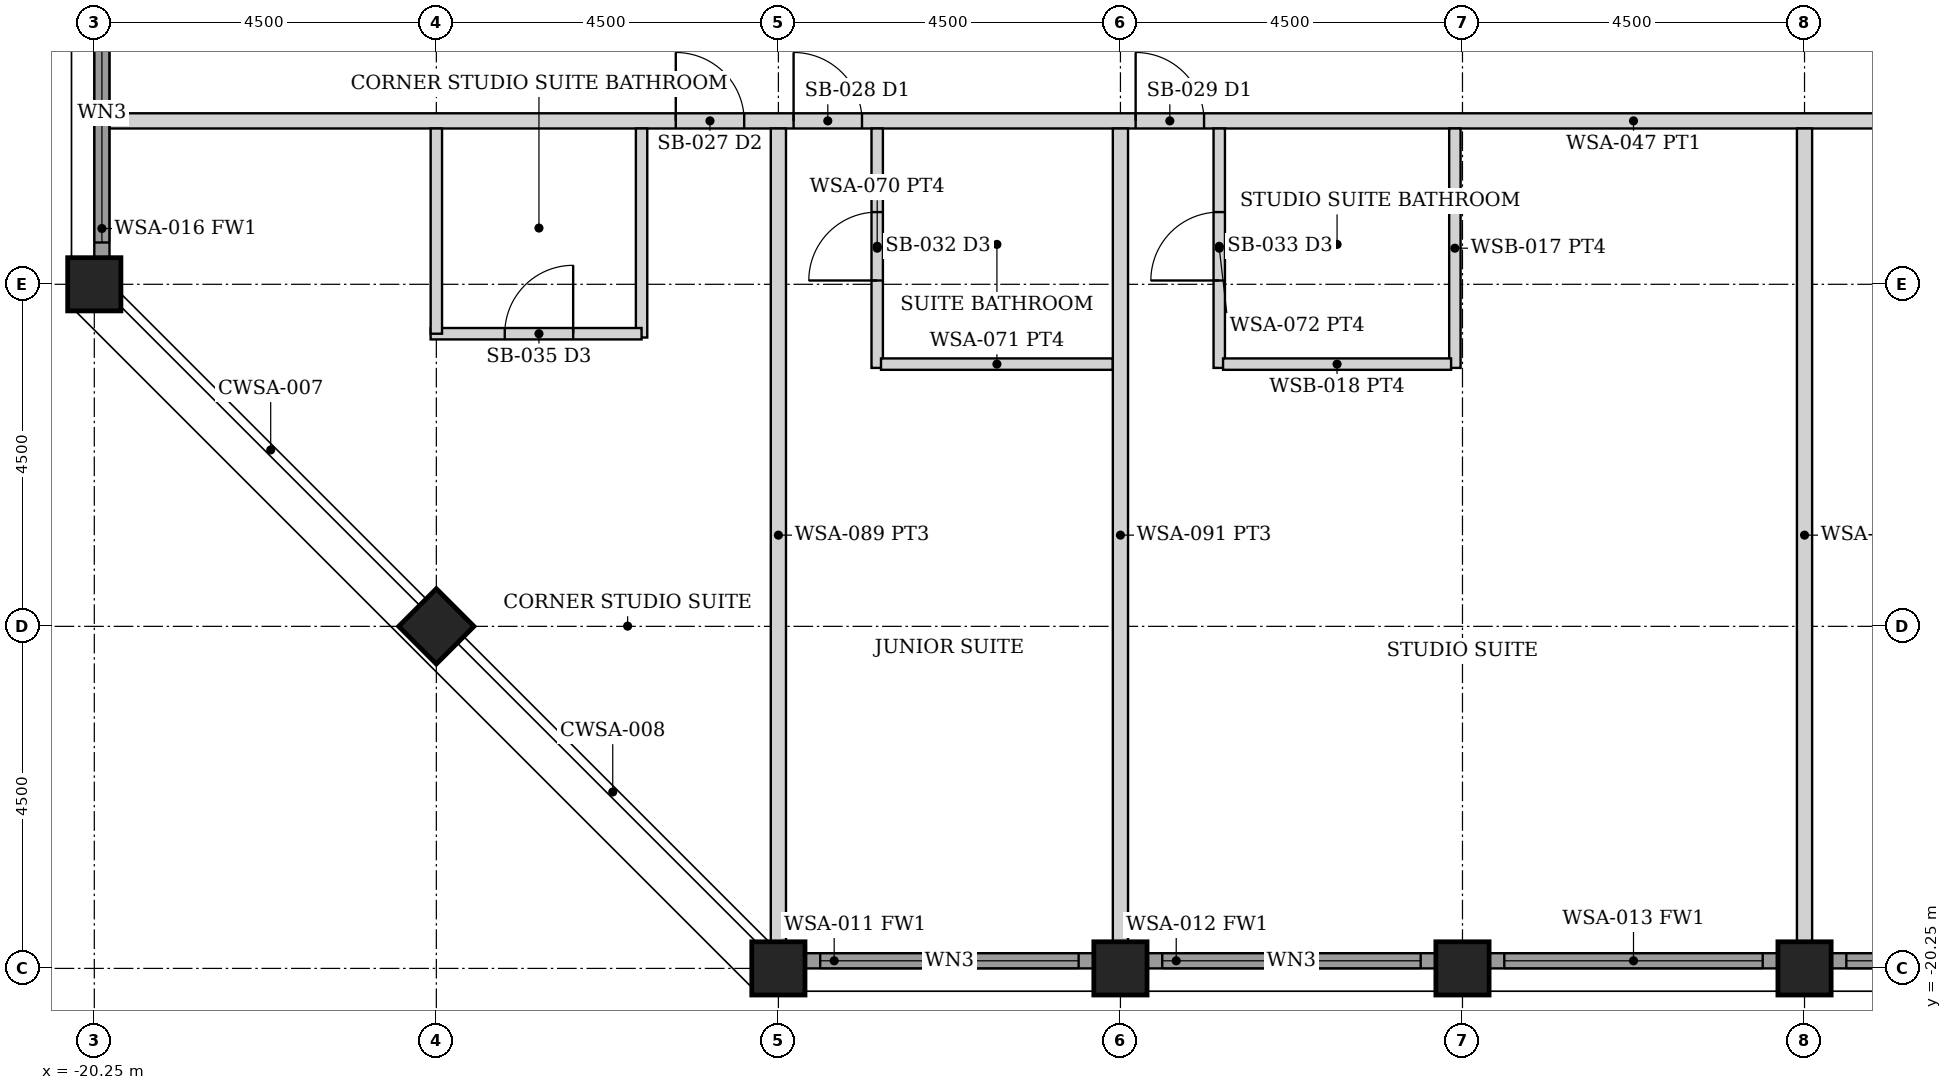
"""IFC4 building model, lengths in metres.
Left out: names, types, materials, properties, quantities, classifications, styles, units other than length and angle.
Written with IfcOpenShell. Run it as: python <this file> out.ifc"""

import sys

from ifc_helpers import new_model, si_unit, direction, frame, frame_2d, origin, origin_2d, place, context, subcontext, project, spatial, rectangle, hollow_rectangle, extrude, element, fill, save


model = new_model("IFC4")
c1 = context("Model", 3, precision=1e-05, world=origin(), true_north=direction((0.0, 1.0)))
c2 = subcontext(c1, "Body", "Model", "MODEL_VIEW")
j1 = project(units=[si_unit("LENGTHUNIT", "METRE"), si_unit("PLANEANGLEUNIT", "RADIAN")], contexts=[c1])
p1 = place(None, origin())
s1 = spatial("IfcSite", under=j1, at=p1, CompositionType="ELEMENT")
p2 = place(p1, origin())
s2 = spatial("IfcBuilding", under=s1, at=p2, CompositionType="ELEMENT")
p3 = place(p2, frame((0.0, 0.0, 212.05)))
s3 = spatial("IfcBuildingStorey", under=s2, at=p3, CompositionType="ELEMENT", Elevation=212.05)
for number, where, z_axis, x_axis in (
    (1, (-11.25, -20.25, 0.0), (0.0, 0.0, 1.0), (0.0, 1.0, 0.0)),
    (2, (-20.25, -11.25, 0.0), (0.0, 0.0, 1.0), (1.0, 0.0, 0.0)),
    (3, (-6.75, -20.25, 0.0), (0.0, 0.0, 1.0), (0.0, 1.0, 0.0)),
    (4, (-2.25, -20.25, 0.0), (0.0, 0.0, 1.0), (0.0, 1.0, 0.0)),
    (5, (2.25, -20.25, 0.0), (0.0, 0.0, 1.0), (0.0, 1.0, 0.0)),
    (6, (-15.75, -15.75, 0.0), (0.0, 0.0, 1.0), (0.707, 0.707, 0.0)),
):
    element("IfcColumn", number, at=place(p3, frame(where, z_axis=z_axis, x_axis=x_axis)), inside=s3, PredefinedType="COLUMN", context=c2, shape_type="SweptSolid", body=[
        extrude(hollow_rectangle(XDim=0.7, YDim=0.7, WallThickness=0.045, at=origin_2d()), origin(), (0.0, 0.0, 1.0), 3.75),
    ])
p4 = place(p3, frame((-10.895, -20.15, 0.0), z_axis=(0.0, 0.0, 1.0), x_axis=(1.0, 0.0, 0.0)))
e7 = element("IfcWall", 7, at=p4, inside=s3, PredefinedType="SOLIDWALL", context=c2, shape_type="SweptSolid", body=[
    extrude(rectangle(XDim=3.79, YDim=0.2, at=frame_2d((1.895, 0.0))), origin(), (0.0, 0.0, 1.0), 2.629),
])
p5 = place(p4, frame((0.195, 0.0, 0.3)))
e8 = element("IfcOpeningElement", 8, at=p5, cuts=e7, PredefinedType="OPENING", context=c2, shape_type="SweptSolid", body=[
    extrude(rectangle(XDim=3.4, YDim=2.179, at=frame_2d((1.7, 1.089))), frame((0.0, 0.11, 0.0), z_axis=(0.0, -1.0, 0.0), x_axis=(1.0, 0.0, 0.0)), (0.0, 0.0, 1.0), 0.22),
])
p6 = place(p3, frame((-6.395, -20.15, 0.0), z_axis=(0.0, 0.0, 1.0), x_axis=(1.0, 0.0, 0.0)))
e9 = element("IfcWall", 9, at=p6, inside=s3, PredefinedType="SOLIDWALL", context=c2, shape_type="SweptSolid", body=[
    extrude(rectangle(XDim=3.79, YDim=0.2, at=frame_2d((1.895, 0.0))), origin(), (0.0, 0.0, 1.0), 2.629),
])
p7 = place(p6, frame((0.195, 0.0, 0.3)))
e10 = element("IfcOpeningElement", 10, at=p7, cuts=e9, PredefinedType="OPENING", context=c2, shape_type="SweptSolid", body=[
    extrude(rectangle(XDim=3.4, YDim=2.179, at=frame_2d((1.7, 1.089))), frame((0.0, 0.11, 0.0), z_axis=(0.0, -1.0, 0.0), x_axis=(1.0, 0.0, 0.0)), (0.0, 0.0, 1.0), 0.22),
])
p8 = place(p3, frame((-1.895, -20.15, 0.0), z_axis=(0.0, 0.0, 1.0), x_axis=(1.0, 0.0, 0.0)))
e11 = element("IfcWall", 11, at=p8, inside=s3, PredefinedType="SOLIDWALL", context=c2, shape_type="SweptSolid", body=[
    extrude(rectangle(XDim=3.79, YDim=0.2, at=frame_2d((1.895, 0.0))), origin(), (0.0, 0.0, 1.0), 2.629),
])
p9 = place(p8, frame((0.195, 0.0, 0.3)))
e12 = element("IfcOpeningElement", 12, at=p9, cuts=e11, PredefinedType="OPENING", context=c2, shape_type="SweptSolid", body=[
    extrude(rectangle(XDim=3.4, YDim=2.179, at=frame_2d((1.7, 1.089))), frame((0.0, 0.11, 0.0), z_axis=(0.0, -1.0, 0.0), x_axis=(1.0, 0.0, 0.0)), (0.0, 0.0, 1.0), 0.22),
])
p10 = place(p3, frame((2.605, -20.15, 0.0), z_axis=(0.0, 0.0, 1.0), x_axis=(1.0, 0.0, 0.0)))
e13 = element("IfcWall", 13, at=p10, inside=s3, PredefinedType="SOLIDWALL", context=c2, shape_type="SweptSolid", body=[
    extrude(rectangle(XDim=3.79, YDim=0.2, at=frame_2d((1.895, 0.0))), origin(), (0.0, 0.0, 1.0), 2.629),
])
p11 = place(p10, frame((0.195, 0.0, 0.3)))
e14 = element("IfcOpeningElement", 14, at=p11, cuts=e13, PredefinedType="OPENING", context=c2, shape_type="SweptSolid", body=[
    extrude(rectangle(XDim=3.4, YDim=2.179, at=frame_2d((1.7, 1.089))), frame((0.0, 0.11, 0.0), z_axis=(0.0, -1.0, 0.0), x_axis=(1.0, 0.0, 0.0)), (0.0, 0.0, 1.0), 0.22),
])
p12 = place(p3, frame((-20.15, -10.895, 0.0), z_axis=(0.0, 0.0, 1.0), x_axis=(0.0, 1.0, 0.0)))
e15 = element("IfcWall", 15, at=p12, inside=s3, PredefinedType="SOLIDWALL", context=c2, shape_type="SweptSolid", body=[
    extrude(rectangle(XDim=3.79, YDim=0.2, at=frame_2d((1.895, 0.0))), origin(), (0.0, 0.0, 1.0), 2.629),
])
p13 = place(p12, frame((0.195, 0.0, 0.3)))
e16 = element("IfcOpeningElement", 16, at=p13, cuts=e15, PredefinedType="OPENING", context=c2, shape_type="SweptSolid", body=[
    extrude(rectangle(XDim=3.4, YDim=2.179, at=frame_2d((1.7, 1.089))), frame((0.0, 0.11, 0.0), z_axis=(0.0, -1.0, 0.0), x_axis=(1.0, 0.0, 0.0)), (0.0, 0.0, 1.0), 0.22),
])
p14 = place(p3, frame((-20.05, -9.1, 0.0), z_axis=(0.0, 0.0, 1.0), x_axis=(1.0, 0.0, 0.0)))
e17 = element("IfcWall", 17, at=p14, inside=s3, PredefinedType="PARTITIONING", context=c2, shape_type="SweptSolid", body=[
    extrude(rectangle(XDim=40.1, YDim=0.2, at=frame_2d((20.05, 0.0))), origin(), (0.0, 0.0, 1.0), 2.629),
])
p15 = place(p14, frame((9.0, 0.0, 0.0)))
e18 = element("IfcOpeningElement", 18, at=p15, cuts=e17, PredefinedType="OPENING", context=c2, shape_type="SweptSolid", body=[
    extrude(rectangle(XDim=0.9, YDim=2.1, at=frame_2d((0.45, 1.05))), frame((0.0, 0.11, 0.0), z_axis=(0.0, -1.0, 0.0), x_axis=(1.0, 0.0, 0.0)), (0.0, 0.0, 1.0), 0.22),
])
p16 = place(p14, frame((13.5, 0.0, 0.0)))
e19 = element("IfcOpeningElement", 19, at=p16, cuts=e17, PredefinedType="OPENING", context=c2, shape_type="SweptSolid", body=[
    extrude(rectangle(XDim=0.9, YDim=2.1, at=frame_2d((0.45, 1.05))), frame((0.0, 0.11, 0.0), z_axis=(0.0, -1.0, 0.0), x_axis=(1.0, 0.0, 0.0)), (0.0, 0.0, 1.0), 0.22),
])
p17 = place(p14, frame((30.2, 0.0, 0.0)))
e20 = element("IfcOpeningElement", 20, at=p17, cuts=e17, PredefinedType="OPENING", context=c2, shape_type="SweptSolid", body=[
    extrude(rectangle(XDim=0.9, YDim=2.1, at=frame_2d((0.45, 1.05))), frame((0.0, 0.11, 0.0), z_axis=(0.0, -1.0, 0.0), x_axis=(1.0, 0.0, 0.0)), (0.0, 0.0, 1.0), 0.22),
])
p18 = place(p14, frame((31.75, 0.0, 0.0)))
e21 = element("IfcOpeningElement", 21, at=p18, cuts=e17, PredefinedType="OPENING", context=c2, shape_type="SweptSolid", body=[
    extrude(rectangle(XDim=0.9, YDim=2.1, at=frame_2d((0.45, 1.05))), frame((0.0, 0.11, 0.0), z_axis=(0.0, -1.0, 0.0), x_axis=(1.0, 0.0, 0.0)), (0.0, 0.0, 1.0), 0.22),
])
p19 = place(p14, frame((7.45, 0.0, 0.0)))
e22 = element("IfcOpeningElement", 22, at=p19, cuts=e17, PredefinedType="OPENING", context=c2, shape_type="SweptSolid", body=[
    extrude(rectangle(XDim=0.9, YDim=2.1, at=frame_2d((0.45, 1.05))), frame((0.0, 0.11, 0.0), z_axis=(0.0, -1.0, 0.0), x_axis=(1.0, 0.0, 0.0)), (0.0, 0.0, 1.0), 0.22),
])
p20 = place(p3, frame((-9.95, -12.35, 0.0), z_axis=(0.0, 0.0, 1.0), x_axis=(0.0, 1.0, 0.0)))
e23 = element("IfcWall", 23, at=p20, inside=s3, PredefinedType="PARTITIONING", context=c2, shape_type="SweptSolid", body=[
    extrude(rectangle(XDim=3.15, YDim=0.15, at=frame_2d((1.575, 0.0))), origin(), (0.0, 0.0, 1.0), 2.629),
])
p21 = place(p20, frame((1.15, 0.0, 0.0)))
e24 = element("IfcOpeningElement", 24, at=p21, cuts=e23, PredefinedType="OPENING", context=c2, shape_type="SweptSolid", body=[
    extrude(rectangle(XDim=0.9, YDim=2.1, at=frame_2d((0.45, 1.05))), frame((0.0, 0.085, 0.0), z_axis=(0.0, -1.0, 0.0), x_axis=(1.0, 0.0, 0.0)), (0.0, 0.0, 1.0), 0.17),
])
p22 = place(p3, frame((-9.9, -12.3, 0.0), z_axis=(0.0, 0.0, 1.0), x_axis=(1.0, 0.0, 0.0)))
e25 = element("IfcWall", 25, at=p22, inside=s3, PredefinedType="PARTITIONING", context=c2, shape_type="SweptSolid", body=[
    extrude(rectangle(XDim=3.05, YDim=0.15, at=frame_2d((1.525, 0.0))), origin(), (0.0, 0.0, 1.0), 2.629),
])
p23 = place(p3, frame((-5.45, -12.35, 0.0), z_axis=(0.0, 0.0, 1.0), x_axis=(0.0, 1.0, 0.0)))
e26 = element("IfcWall", 26, at=p23, inside=s3, PredefinedType="PARTITIONING", context=c2, shape_type="SweptSolid", body=[
    extrude(rectangle(XDim=3.15, YDim=0.15, at=frame_2d((1.575, 0.0))), origin(), (0.0, 0.0, 1.0), 2.629),
])
p24 = place(p23, frame((1.15, 0.0, 0.0)))
e27 = element("IfcOpeningElement", 27, at=p24, cuts=e26, PredefinedType="OPENING", context=c2, shape_type="SweptSolid", body=[
    extrude(rectangle(XDim=0.9, YDim=2.1, at=frame_2d((0.45, 1.05))), frame((0.0, 0.085, 0.0), z_axis=(0.0, -1.0, 0.0), x_axis=(1.0, 0.0, 0.0)), (0.0, 0.0, 1.0), 0.17),
])
p25 = place(p3, frame((-2.35, -12.35, 0.0), z_axis=(0.0, 0.0, 1.0), x_axis=(0.0, 1.0, 0.0)))
e28 = element("IfcWall", 28, at=p25, inside=s3, PredefinedType="PARTITIONING", context=c2, shape_type="SweptSolid", body=[
    extrude(rectangle(XDim=3.15, YDim=0.15, at=frame_2d((1.575, 0.0))), origin(), (0.0, 0.0, 1.0), 2.629),
])
p26 = place(p3, frame((-5.4, -12.3, 0.0), z_axis=(0.0, 0.0, 1.0), x_axis=(1.0, 0.0, 0.0)))
e29 = element("IfcWall", 29, at=p26, inside=s3, PredefinedType="PARTITIONING", context=c2, shape_type="SweptSolid", body=[
    extrude(rectangle(XDim=3.0, YDim=0.15, at=frame_2d((1.5, 0.0))), origin(), (0.0, 0.0, 1.0), 2.629),
])
for number, where, z_axis, x_axis in (
    (30, (-11.25, -19.9, 0.0), (0.0, 0.0, 1.0), (0.0, 1.0, 0.0)),
    (31, (-6.75, -19.9, 0.0), (0.0, 0.0, 1.0), (0.0, 1.0, 0.0)),
    (32, (2.25, -19.9, 0.0), (0.0, 0.0, 1.0), (0.0, 1.0, 0.0)),
):
    element("IfcWall", number, at=place(p3, frame(where, z_axis=z_axis, x_axis=x_axis)), inside=s3, PredefinedType="PARTITIONING", context=c2, shape_type="SweptSolid", body=[
        extrude(rectangle(XDim=10.7, YDim=0.2, at=frame_2d((5.35, 0.0))), origin(), (0.0, 0.0, 1.0), 2.629),
    ])
p27 = place(p3, frame((-13.05, -11.95, 0.0), z_axis=(0.0, 0.0, 1.0), x_axis=(0.0, 1.0, 0.0)))
e33 = element("IfcWall", 33, at=p27, inside=s3, PredefinedType="PARTITIONING", context=c2, shape_type="SweptSolid", body=[
    extrude(rectangle(XDim=2.75, YDim=0.15, at=frame_2d((1.375, 0.0))), origin(), (0.0, 0.0, 1.0), 2.629),
])
p28 = place(p3, frame((-15.825, -11.9, 0.0), z_axis=(0.0, 0.0, 1.0), x_axis=(1.0, 0.0, 0.0)))
e34 = element("IfcWall", 34, at=p28, inside=s3, PredefinedType="PARTITIONING", context=c2, shape_type="SweptSolid", body=[
    extrude(rectangle(XDim=2.775, YDim=0.15, at=frame_2d((1.387, 0.0))), origin(), (0.0, 0.0, 1.0), 2.629),
])
p29 = place(p28, frame((0.975, 0.0, 0.0)))
e35 = element("IfcOpeningElement", 35, at=p29, cuts=e34, PredefinedType="OPENING", context=c2, shape_type="SweptSolid", body=[
    extrude(rectangle(XDim=0.9, YDim=2.1, at=frame_2d((0.45, 1.05))), frame((0.0, 0.085, 0.0), z_axis=(0.0, -1.0, 0.0), x_axis=(1.0, 0.0, 0.0)), (0.0, 0.0, 1.0), 0.17),
])
p30 = place(p3, frame((-15.75, -11.9, 0.0), z_axis=(0.0, 0.0, 1.0), x_axis=(0.0, 1.0, 0.0)))
e36 = element("IfcWall", 36, at=p30, inside=s3, PredefinedType="PARTITIONING", context=c2, shape_type="SweptSolid", body=[
    extrude(rectangle(XDim=2.7, YDim=0.15, at=frame_2d((1.35, 0.0))), origin(), (0.0, 0.0, 1.0), 2.629),
])
p31 = place(p5, origin())
e37 = element("IfcWindow", 37, at=p31, inside=s3, PartitioningType="SINGLE_PANEL", PredefinedType="WINDOW", context=c2, shape_type="SweptSolid", body=[
    extrude(rectangle(XDim=3.4, YDim=2.179, at=frame_2d((1.7, 1.089))), frame((0.0, 0.03, 0.0), z_axis=(0.0, -1.0, 0.0), x_axis=(1.0, 0.0, 0.0)), (0.0, 0.0, 1.0), 0.06),
])
fill(e8, e37)
p32 = place(p7, origin())
e38 = element("IfcWindow", 38, at=p32, inside=s3, PartitioningType="SINGLE_PANEL", PredefinedType="WINDOW", context=c2, shape_type="SweptSolid", body=[
    extrude(rectangle(XDim=3.4, YDim=2.179, at=frame_2d((1.7, 1.089))), frame((0.0, 0.03, 0.0), z_axis=(0.0, -1.0, 0.0), x_axis=(1.0, 0.0, 0.0)), (0.0, 0.0, 1.0), 0.06),
])
fill(e10, e38)
p33 = place(p9, origin())
e39 = element("IfcWindow", 39, at=p33, inside=s3, PartitioningType="SINGLE_PANEL", PredefinedType="WINDOW", context=c2, shape_type="SweptSolid", body=[
    extrude(rectangle(XDim=3.4, YDim=2.179, at=frame_2d((1.7, 1.089))), frame((0.0, 0.03, 0.0), z_axis=(0.0, -1.0, 0.0), x_axis=(1.0, 0.0, 0.0)), (0.0, 0.0, 1.0), 0.06),
])
fill(e12, e39)
p34 = place(p11, origin())
e40 = element("IfcWindow", 40, at=p34, inside=s3, PartitioningType="SINGLE_PANEL", PredefinedType="WINDOW", context=c2, shape_type="SweptSolid", body=[
    extrude(rectangle(XDim=3.4, YDim=2.179, at=frame_2d((1.7, 1.089))), frame((0.0, 0.03, 0.0), z_axis=(0.0, -1.0, 0.0), x_axis=(1.0, 0.0, 0.0)), (0.0, 0.0, 1.0), 0.06),
])
fill(e14, e40)
p35 = place(p13, origin())
e41 = element("IfcWindow", 41, at=p35, inside=s3, PartitioningType="SINGLE_PANEL", PredefinedType="WINDOW", context=c2, shape_type="SweptSolid", body=[
    extrude(rectangle(XDim=3.4, YDim=2.179, at=frame_2d((1.7, 1.089))), frame((0.0, 0.03, 0.0), z_axis=(0.0, -1.0, 0.0), x_axis=(1.0, 0.0, 0.0)), (0.0, 0.0, 1.0), 0.06),
])
fill(e16, e41)
p36 = place(p15, origin())
e42 = element("IfcDoor", 42, at=p36, inside=s3, OperationType="SINGLE_SWING_LEFT", PredefinedType="DOOR", context=c2, shape_type="SweptSolid", body=[
    extrude(rectangle(XDim=0.9, YDim=2.1, at=frame_2d((0.45, 1.05))), frame((0.0, 0.025, 0.0), z_axis=(0.0, -1.0, 0.0), x_axis=(1.0, 0.0, 0.0)), (0.0, 0.0, 1.0), 0.05),
])
fill(e18, e42)
p37 = place(p21, origin())
e43 = element("IfcDoor", 43, at=p37, inside=s3, OperationType="SINGLE_SWING_LEFT", PredefinedType="DOOR", context=c2, shape_type="SweptSolid", body=[
    extrude(rectangle(XDim=0.9, YDim=2.1, at=frame_2d((0.45, 1.05))), frame((0.0, 0.025, 0.0), z_axis=(0.0, -1.0, 0.0), x_axis=(1.0, 0.0, 0.0)), (0.0, 0.0, 1.0), 0.05),
])
fill(e24, e43)
p38 = place(p16, origin())
e44 = element("IfcDoor", 44, at=p38, inside=s3, OperationType="SINGLE_SWING_LEFT", PredefinedType="DOOR", context=c2, shape_type="SweptSolid", body=[
    extrude(rectangle(XDim=0.9, YDim=2.1, at=frame_2d((0.45, 1.05))), frame((0.0, 0.025, 0.0), z_axis=(0.0, -1.0, 0.0), x_axis=(1.0, 0.0, 0.0)), (0.0, 0.0, 1.0), 0.05),
])
fill(e19, e44)
p39 = place(p24, origin())
e45 = element("IfcDoor", 45, at=p39, inside=s3, OperationType="SINGLE_SWING_LEFT", PredefinedType="DOOR", context=c2, shape_type="SweptSolid", body=[
    extrude(rectangle(XDim=0.9, YDim=2.1, at=frame_2d((0.45, 1.05))), frame((0.0, 0.025, 0.0), z_axis=(0.0, -1.0, 0.0), x_axis=(1.0, 0.0, 0.0)), (0.0, 0.0, 1.0), 0.05),
])
fill(e27, e45)
p40 = place(p19, origin())
e46 = element("IfcDoor", 46, at=p40, inside=s3, OperationType="SINGLE_SWING_LEFT", PredefinedType="DOOR", context=c2, shape_type="SweptSolid", body=[
    extrude(rectangle(XDim=0.9, YDim=2.1, at=frame_2d((0.45, 1.05))), frame((0.0, 0.025, 0.0), z_axis=(0.0, -1.0, 0.0), x_axis=(1.0, 0.0, 0.0)), (0.0, 0.0, 1.0), 0.05),
])
fill(e22, e46)
p41 = place(p29, origin())
e47 = element("IfcDoor", 47, at=p41, inside=s3, OperationType="SINGLE_SWING_RIGHT", PredefinedType="DOOR", context=c2, shape_type="SweptSolid", body=[
    extrude(rectangle(XDim=0.9, YDim=2.1, at=frame_2d((0.45, 1.05))), frame((0.0, 0.025, 0.0), z_axis=(0.0, -1.0, 0.0), x_axis=(1.0, 0.0, 0.0)), (0.0, 0.0, 1.0), 0.05),
])
fill(e35, e47)
save(model, sys.argv[1])
